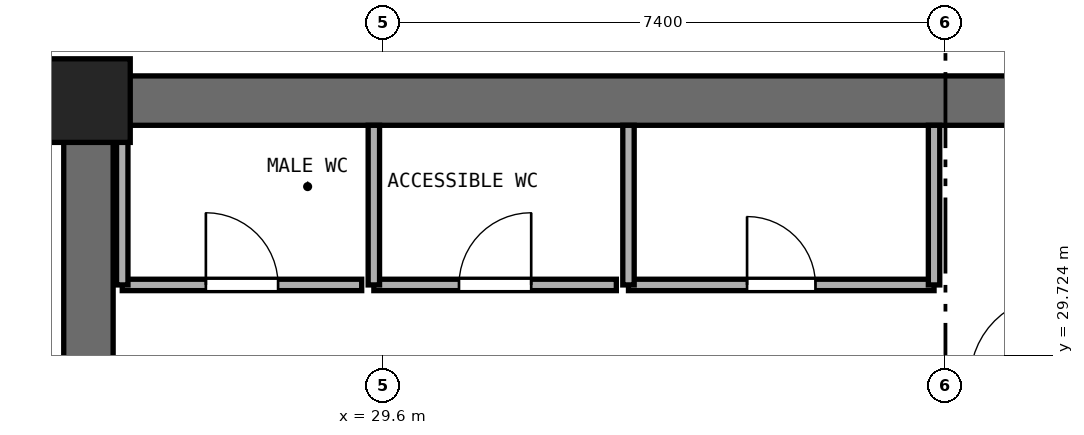
"""IFC4 building model, lengths in metres.
Left out: names, types, materials, properties, quantities, classifications, styles, units other than length and angle.
Written with IfcOpenShell. Run it as: python <this file> out.ifc"""

import sys

from ifc_helpers import new_model, si_unit, direction, frame, frame_2d, origin, origin_2d, place, context, subcontext, project, spatial, rectangle, extrude, element, fill, save


model = new_model("IFC4")
c1 = context("Model", 3, precision=1e-05, world=origin(), true_north=direction((0.0, 1.0)))
c2 = subcontext(c1, "Body", "Model", "MODEL_VIEW")
j1 = project(units=[si_unit("LENGTHUNIT", "METRE"), si_unit("PLANEANGLEUNIT", "RADIAN")], contexts=[c1])
p1 = place(None, origin())
s1 = spatial("IfcSite", under=j1, at=p1, CompositionType="ELEMENT")
p2 = place(p1, origin())
s2 = spatial("IfcBuilding", under=s1, at=p2, CompositionType="ELEMENT")
p3 = place(p2, frame((0.0, 0.0, 5.0)))
s3 = spatial("IfcBuildingStorey", under=s2, at=p3, CompositionType="ELEMENT", Elevation=5.0)
p4 = place(p3, frame((25.4, 33.075, 0.0), z_axis=(0.0, 0.0, 1.0), x_axis=(1.0, 0.0, 0.0)))
e1 = element("IfcWall", 1, at=p4, inside=s3, PredefinedType="SHEAR", context=c2, shape_type="SweptSolid", body=[
    extrude(rectangle(XDim=23.2, YDim=0.65, at=frame_2d((11.6, 0.0))), origin(), (0.0, 0.0, 1.0), 4.66),
])
p5 = place(p3, frame((25.725, 17.65, 0.0), z_axis=(0.0, 0.0, 1.0), x_axis=(0.0, 1.0, 0.0)))
e2 = element("IfcWall", 2, at=p5, inside=s3, PredefinedType="SHEAR", context=c2, shape_type="SweptSolid", body=[
    extrude(rectangle(XDim=15.1, YDim=0.65, at=frame_2d((7.55, 0.0))), origin(), (0.0, 0.0, 1.0), 4.66),
])
p6 = place(p5, frame((6.8, 0.0, 0.0)))
e3 = element("IfcOpeningElement", 3, at=p6, cuts=e2, PredefinedType="OPENING", context=c2, shape_type="SweptSolid", body=[
    extrude(rectangle(XDim=1.5, YDim=2.15, at=frame_2d((0.75, 1.075))), frame((0.0, 0.335, 0.0), z_axis=(0.0, -1.0, 0.0), x_axis=(1.0, 0.0, 0.0)), (0.0, 0.0, 1.0), 0.67),
])
p7 = place(p3, frame((25.725, 33.075, 0.0), z_axis=(0.0, 0.0, 1.0), x_axis=(1.0, 0.0, 0.0)))
e4 = element("IfcColumn", 4, at=p7, inside=s3, PredefinedType="PILASTER", context=c2, shape_type="SweptSolid", body=[
    extrude(rectangle(XDim=1.1, YDim=1.1, at=origin_2d()), origin(), (0.0, 0.0, 1.0), 5.0),
])
p8 = place(p3, frame((26.17, 30.65, 0.0), z_axis=(0.0, 0.0, 1.0), x_axis=(1.0, 0.0, 0.0)))
e5 = element("IfcWall", 5, at=p8, inside=s3, PredefinedType="PARTITIONING", context=c2, shape_type="SweptSolid", body=[
    extrude(rectangle(XDim=3.15, YDim=0.15, at=frame_2d((1.575, 0.0))), origin(), (0.0, 0.0, 1.0), 4.66),
])
p9 = place(p8, frame((1.1, 0.0, 0.0)))
e6 = element("IfcOpeningElement", 6, at=p9, cuts=e5, PredefinedType="OPENING", context=c2, shape_type="SweptSolid", body=[
    extrude(rectangle(XDim=0.95, YDim=2.1, at=frame_2d((0.475, 1.05))), frame((0.0, 0.085, 0.0), z_axis=(0.0, -1.0, 0.0), x_axis=(1.0, 0.0, 0.0)), (0.0, 0.0, 1.0), 0.17),
])
p10 = place(p3, frame((26.17, 30.65, 0.0), z_axis=(0.0, 0.0, 1.0), x_axis=(0.0, 1.0, 0.0)))
e7 = element("IfcWall", 7, at=p10, inside=s3, PredefinedType="PARTITIONING", context=c2, shape_type="SweptSolid", body=[
    extrude(rectangle(XDim=2.1, YDim=0.15, at=frame_2d((1.05, 0.0))), origin(), (0.0, 0.0, 1.0), 4.66),
])
p11 = place(p3, frame((29.48, 30.65, 0.0), z_axis=(0.0, 0.0, 1.0), x_axis=(1.0, 0.0, 0.0)))
e8 = element("IfcWall", 8, at=p11, inside=s3, PredefinedType="PARTITIONING", context=c2, shape_type="SweptSolid", body=[
    extrude(rectangle(XDim=3.19, YDim=0.15, at=frame_2d((1.595, 0.0))), origin(), (0.0, 0.0, 1.0), 4.66),
])
p12 = place(p11, frame((1.12, 0.0, 0.0)))
e9 = element("IfcOpeningElement", 9, at=p12, cuts=e8, PredefinedType="OPENING", context=c2, shape_type="SweptSolid", body=[
    extrude(rectangle(XDim=0.95, YDim=2.1, at=frame_2d((0.475, 1.05))), frame((0.0, 0.085, 0.0), z_axis=(0.0, -1.0, 0.0), x_axis=(1.0, 0.0, 0.0)), (0.0, 0.0, 1.0), 0.17),
])
p13 = place(p3, frame((29.48, 30.65, 0.0), z_axis=(0.0, 0.0, 1.0), x_axis=(0.0, 1.0, 0.0)))
e10 = element("IfcWall", 10, at=p13, inside=s3, PredefinedType="PARTITIONING", context=c2, shape_type="SweptSolid", body=[
    extrude(rectangle(XDim=2.1, YDim=0.15, at=frame_2d((1.05, 0.0))), origin(), (0.0, 0.0, 1.0), 4.66),
])
p14 = place(p3, frame((32.83, 30.65, 0.0), z_axis=(0.0, 0.0, 1.0), x_axis=(1.0, 0.0, 0.0)))
e11 = element("IfcWall", 11, at=p14, inside=s3, PredefinedType="PARTITIONING", context=c2, shape_type="SweptSolid", body=[
    extrude(rectangle(XDim=4.02, YDim=0.15, at=frame_2d((2.01, 0.0))), origin(), (0.0, 0.0, 1.0), 4.66),
])
p15 = place(p14, frame((1.56, 0.0, 0.0)))
e12 = element("IfcOpeningElement", 12, at=p15, cuts=e11, PredefinedType="OPENING", context=c2, shape_type="SweptSolid", body=[
    extrude(rectangle(XDim=0.9, YDim=2.1, at=frame_2d((0.45, 1.05))), frame((0.0, 0.085, 0.0), z_axis=(0.0, -1.0, 0.0), x_axis=(1.0, 0.0, 0.0)), (0.0, 0.0, 1.0), 0.17),
])
for number, where, z_axis, x_axis in (
    (13, (32.83, 30.65, 0.0), (0.0, 0.0, 1.0), (0.0, 1.0, 0.0)),
    (14, (36.85, 30.65, 0.0), (0.0, 0.0, 1.0), (0.0, 1.0, 0.0)),
):
    element("IfcWall", number, at=place(p3, frame(where, z_axis=z_axis, x_axis=x_axis)), inside=s3, PredefinedType="PARTITIONING", context=c2, shape_type="SweptSolid", body=[
        extrude(rectangle(XDim=2.1, YDim=0.15, at=frame_2d((1.05, 0.0))), origin(), (0.0, 0.0, 1.0), 4.66),
    ])
p16 = place(p9, origin())
e15 = element("IfcDoor", 15, at=p16, inside=s3, OperationType="SINGLE_SWING_LEFT", PredefinedType="DOOR", context=c2, shape_type="SweptSolid", body=[
    extrude(rectangle(XDim=0.95, YDim=2.1, at=frame_2d((0.475, 1.05))), frame((0.0, 0.025, 0.0), z_axis=(0.0, -1.0, 0.0), x_axis=(1.0, 0.0, 0.0)), (0.0, 0.0, 1.0), 0.05),
])
fill(e6, e15)
p17 = place(p12, origin())
e16 = element("IfcDoor", 16, at=p17, inside=s3, OperationType="SINGLE_SWING_RIGHT", PredefinedType="DOOR", context=c2, shape_type="SweptSolid", body=[
    extrude(rectangle(XDim=0.95, YDim=2.1, at=frame_2d((0.475, 1.05))), frame((0.0, 0.025, 0.0), z_axis=(0.0, -1.0, 0.0), x_axis=(1.0, 0.0, 0.0)), (0.0, 0.0, 1.0), 0.05),
])
fill(e9, e16)
p18 = place(p15, origin())
e17 = element("IfcDoor", 17, at=p18, inside=s3, OperationType="SINGLE_SWING_LEFT", PredefinedType="DOOR", context=c2, shape_type="SweptSolid", body=[
    extrude(rectangle(XDim=0.9, YDim=2.1, at=frame_2d((0.45, 1.05))), frame((0.0, 0.025, 0.0), z_axis=(0.0, -1.0, 0.0), x_axis=(1.0, 0.0, 0.0)), (0.0, 0.0, 1.0), 0.05),
])
fill(e12, e17)
save(model, sys.argv[1])
